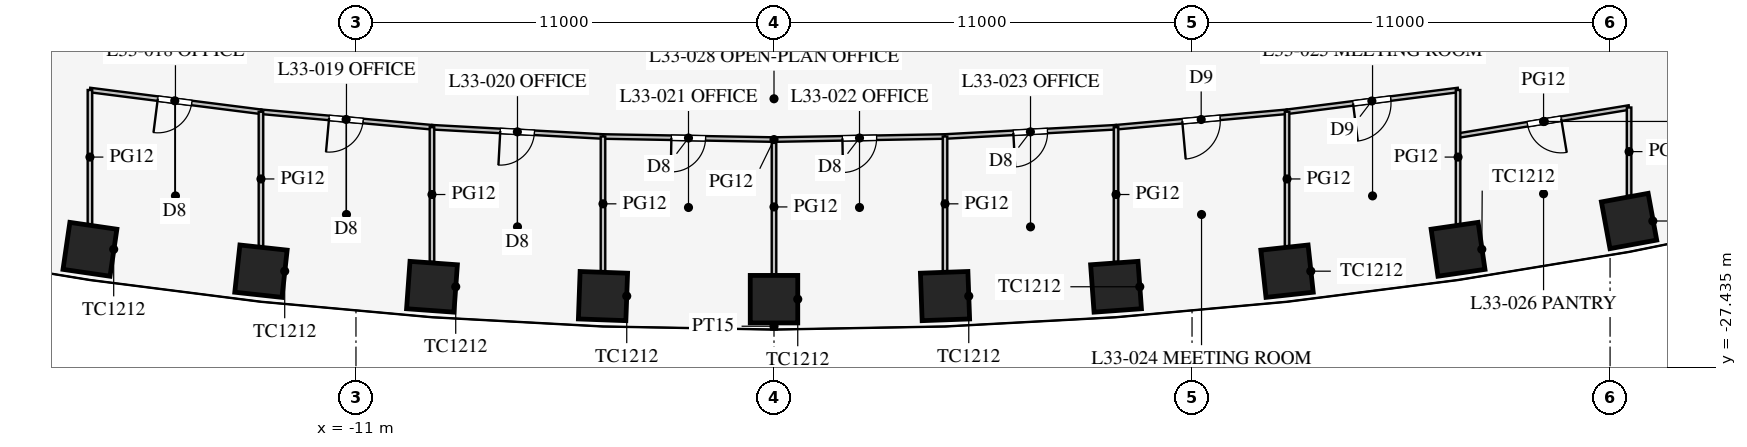
"""IFC4 building model, lengths in metres.
Left out: names, types, materials, properties, quantities, classifications, styles, units other than length and angle.
Written with IfcOpenShell. Run it as: python <this file> out.ifc"""

import sys

from ifc_helpers import new_model, si_unit, direction, frame, frame_2d, origin, origin_2d, place, context, subcontext, project, spatial, rectangle, extrude, element, fill, save


model = new_model("IFC4")
c1 = context("Model", 3, precision=1e-05, world=origin(), true_north=direction((0.0, 1.0)))
c2 = subcontext(c1, "Body", "Model", "MODEL_VIEW")
j1 = project(units=[si_unit("LENGTHUNIT", "METRE"), si_unit("PLANEANGLEUNIT", "RADIAN")], contexts=[c1])
p1 = place(None, origin())
s1 = spatial("IfcSite", under=j1, at=p1, CompositionType="ELEMENT")
p2 = place(p1, origin())
s2 = spatial("IfcBuilding", under=s1, at=p2, CompositionType="ELEMENT")
p3 = place(p2, frame((0.0, 0.0, 145.1)))
s3 = spatial("IfcBuildingStorey", under=s2, at=p3, CompositionType="ELEMENT", Elevation=145.1)
for number, where, z_axis, x_axis in (
    (1, (-18.0, -24.337, 0.0), (0.0, 0.0, 1.0), (0.99, -0.144, 0.0)),
    (2, (-13.5, -24.913, 0.0), (0.0, 0.0, 1.0), (0.994, -0.108, 0.0)),
    (3, (-9.0, -25.323, 0.0), (0.0, 0.0, 1.0), (0.997, -0.072, 0.0)),
    (4, (-4.5, -25.568, 0.0), (0.0, 0.0, 1.0), (0.999, -0.036, 0.0)),
    (5, (0.0, -25.65, 0.0), (0.0, 0.0, 1.0), (1.0, 0.0, 0.0)),
    (6, (4.5, -25.568, 0.0), (0.0, 0.0, 1.0), (0.999, 0.036, 0.0)),
    (7, (9.0, -25.323, 0.0), (0.0, 0.0, 1.0), (0.997, 0.072, 0.0)),
    (8, (13.5, -24.913, 0.0), (0.0, 0.0, 1.0), (0.994, 0.108, 0.0)),
    (9, (18.0, -24.337, 0.0), (0.0, 0.0, 1.0), (0.99, 0.144, 0.0)),
    (10, (22.5, -23.593, 0.0), (0.0, 0.0, 1.0), (0.984, 0.18, 0.0)),
):
    element("IfcColumn", number, at=place(p3, frame(where, z_axis=z_axis, x_axis=x_axis)), inside=s3, PredefinedType="COLUMN", context=c2, shape_type="SweptSolid", body=[
        extrude(rectangle(XDim=1.25, YDim=1.25, at=origin_2d()), origin(), (0.0, 0.0, 1.0), 4.2),
    ])
p4 = place(p3, frame((0.0, -26.279, 0.0), z_axis=(0.0, 0.0, 1.0), x_axis=(0.0, -1.0, 0.0)))
e11 = element("IfcWall", 11, at=p4, inside=s3, PredefinedType="PARTITIONING", context=c2, shape_type="SweptSolid", body=[
    extrude(rectangle(XDim=0.166, YDim=0.15, at=frame_2d((0.083, 0.0))), origin(), (0.0, 0.0, 1.0), 2.9),
])
p5 = place(p3, frame((0.0, -21.45, 0.0), z_axis=(0.0, 0.0, 1.0), x_axis=(0.999837820638, 0.018009231578, 0.0)))
e12 = element("IfcWall", 12, at=p5, inside=s3, PredefinedType="PARTITIONING", context=c2, shape_type="SweptSolid", body=[
    extrude(rectangle(XDim=4.501, YDim=0.12, at=frame_2d((2.25, 0.0))), origin(), (0.0, 0.0, 1.0), 2.9),
])
p6 = place(p5, frame((1.8, 0.0, 0.15)))
e13 = element("IfcOpeningElement", 13, at=p6, cuts=e12, PredefinedType="OPENING", context=c2, shape_type="SweptSolid", body=[
    extrude(rectangle(XDim=0.9, YDim=2.1, at=frame_2d((0.45, 1.05))), frame((0.0, 0.07, 0.0), z_axis=(0.0, -1.0, 0.0), x_axis=(1.0, 0.0, 0.0)), (0.0, 0.0, 1.0), 0.14),
])
p7 = place(p3, frame((13.5, -20.718, 0.0), z_axis=(0.0, 0.0, 1.0), x_axis=(0.992010652594, 0.12615413247, 0.0)))
e14 = element("IfcWall", 14, at=p7, inside=s3, PredefinedType="PARTITIONING", context=c2, shape_type="SweptSolid", body=[
    extrude(rectangle(XDim=4.536, YDim=0.12, at=frame_2d((2.268, 0.0))), origin(), (0.0, 0.0, 1.0), 2.9),
])
p8 = place(p7, frame((1.75, 0.0, 0.15)))
e15 = element("IfcOpeningElement", 15, at=p8, cuts=e14, PredefinedType="OPENING", context=c2, shape_type="SweptSolid", body=[
    extrude(rectangle(XDim=1.0, YDim=2.1, at=frame_2d((0.5, 1.05))), frame((0.0, 0.07, 0.0), z_axis=(0.0, -1.0, 0.0), x_axis=(1.0, 0.0, 0.0)), (0.0, 0.0, 1.0), 0.14),
])
p9 = place(p3, frame((18.0, -21.345, 0.0), z_axis=(0.0, 0.0, 1.0), x_axis=(0.986764681833, 0.162158757664, 0.0)))
e16 = element("IfcWall", 16, at=p9, inside=s3, PredefinedType="PARTITIONING", context=c2, shape_type="SweptSolid", body=[
    extrude(rectangle(XDim=4.56, YDim=0.12, at=frame_2d((2.28, 0.0))), origin(), (0.0, 0.0, 1.0), 2.9),
])
p10 = place(p9, frame((1.85, 0.0, 0.15)))
e17 = element("IfcOpeningElement", 17, at=p10, cuts=e16, PredefinedType="OPENING", context=c2, shape_type="SweptSolid", body=[
    extrude(rectangle(XDim=0.9, YDim=2.1, at=frame_2d((0.45, 1.05))), frame((0.0, 0.07, 0.0), z_axis=(0.0, -1.0, 0.0), x_axis=(1.0, 0.0, 0.0)), (0.0, 0.0, 1.0), 0.14),
])
p11 = place(p3, frame((4.5, -21.369, 0.0), z_axis=(0.0, 0.0, 1.0), x_axis=(0.998537376538, 0.054065771581, 0.0)))
e18 = element("IfcWall", 18, at=p11, inside=s3, PredefinedType="PARTITIONING", context=c2, shape_type="SweptSolid", body=[
    extrude(rectangle(XDim=4.507, YDim=0.12, at=frame_2d((2.253, 0.0))), origin(), (0.0, 0.0, 1.0), 2.9),
])
p12 = place(p11, frame((1.8, 0.0, 0.15)))
e19 = element("IfcOpeningElement", 19, at=p12, cuts=e18, PredefinedType="OPENING", context=c2, shape_type="SweptSolid", body=[
    extrude(rectangle(XDim=0.9, YDim=2.1, at=frame_2d((0.45, 1.05))), frame((0.0, 0.07, 0.0), z_axis=(0.0, -1.0, 0.0), x_axis=(1.0, 0.0, 0.0)), (0.0, 0.0, 1.0), 0.14),
])
p13 = place(p3, frame((9.0, -21.125, 0.0), z_axis=(0.0, 0.0, 1.0), x_axis=(0.995930325215, 0.090126507295, 0.0)))
e20 = element("IfcWall", 20, at=p13, inside=s3, PredefinedType="PARTITIONING", context=c2, shape_type="SweptSolid", body=[
    extrude(rectangle(XDim=4.518, YDim=0.12, at=frame_2d((2.259, 0.0))), origin(), (0.0, 0.0, 1.0), 2.9),
])
p14 = place(p13, frame((1.75, 0.0, 0.15)))
e21 = element("IfcOpeningElement", 21, at=p14, cuts=e20, PredefinedType="OPENING", context=c2, shape_type="SweptSolid", body=[
    extrude(rectangle(XDim=1.0, YDim=2.1, at=frame_2d((0.5, 1.05))), frame((0.0, 0.07, 0.0), z_axis=(0.0, -1.0, 0.0), x_axis=(1.0, 0.0, 0.0)), (0.0, 0.0, 1.0), 0.14),
])
p15 = place(p3, frame((-13.5, -20.718, 0.0), z_axis=(0.0, 0.0, 1.0), x_axis=(0.995930325215, -0.090126507295, 0.0)))
e22 = element("IfcWall", 22, at=p15, inside=s3, PredefinedType="PARTITIONING", context=c2, shape_type="SweptSolid", body=[
    extrude(rectangle(XDim=4.518, YDim=0.12, at=frame_2d((2.259, 0.0))), origin(), (0.0, 0.0, 1.0), 2.9),
])
p16 = place(p15, frame((1.8, 0.0, 0.15)))
e23 = element("IfcOpeningElement", 23, at=p16, cuts=e22, PredefinedType="OPENING", context=c2, shape_type="SweptSolid", body=[
    extrude(rectangle(XDim=0.9, YDim=2.1, at=frame_2d((0.45, 1.05))), frame((0.0, 0.07, 0.0), z_axis=(0.0, -1.0, 0.0), x_axis=(1.0, 0.0, 0.0)), (0.0, 0.0, 1.0), 0.14),
])
p17 = place(p3, frame((-18.0, -20.146, 0.0), z_axis=(0.0, 0.0, 1.0), x_axis=(0.992010652594, -0.12615413247, 0.0)))
e24 = element("IfcWall", 24, at=p17, inside=s3, PredefinedType="PARTITIONING", context=c2, shape_type="SweptSolid", body=[
    extrude(rectangle(XDim=4.536, YDim=0.12, at=frame_2d((2.268, 0.0))), origin(), (0.0, 0.0, 1.0), 2.9),
])
p18 = place(p17, frame((1.8, 0.0, 0.15)))
e25 = element("IfcOpeningElement", 25, at=p18, cuts=e24, PredefinedType="OPENING", context=c2, shape_type="SweptSolid", body=[
    extrude(rectangle(XDim=0.9, YDim=2.1, at=frame_2d((0.45, 1.05))), frame((0.0, 0.07, 0.0), z_axis=(0.0, -1.0, 0.0), x_axis=(1.0, 0.0, 0.0)), (0.0, 0.0, 1.0), 0.14),
])
p19 = place(p3, frame((-4.5, -21.369, 0.0), z_axis=(0.0, 0.0, 1.0), x_axis=(0.999837820638, -0.018009231578, 0.0)))
e26 = element("IfcWall", 26, at=p19, inside=s3, PredefinedType="PARTITIONING", context=c2, shape_type="SweptSolid", body=[
    extrude(rectangle(XDim=4.501, YDim=0.12, at=frame_2d((2.25, 0.0))), origin(), (0.0, 0.0, 1.0), 2.9),
])
p20 = place(p19, frame((1.8, 0.0, 0.15)))
e27 = element("IfcOpeningElement", 27, at=p20, cuts=e26, PredefinedType="OPENING", context=c2, shape_type="SweptSolid", body=[
    extrude(rectangle(XDim=0.9, YDim=2.1, at=frame_2d((0.45, 1.05))), frame((0.0, 0.07, 0.0), z_axis=(0.0, -1.0, 0.0), x_axis=(1.0, 0.0, 0.0)), (0.0, 0.0, 1.0), 0.14),
])
p21 = place(p3, frame((-9.0, -21.125, 0.0), z_axis=(0.0, 0.0, 1.0), x_axis=(0.998537376538, -0.054065771581, 0.0)))
e28 = element("IfcWall", 28, at=p21, inside=s3, PredefinedType="PARTITIONING", context=c2, shape_type="SweptSolid", body=[
    extrude(rectangle(XDim=4.507, YDim=0.12, at=frame_2d((2.253, 0.0))), origin(), (0.0, 0.0, 1.0), 2.9),
])
p22 = place(p21, frame((1.8, 0.0, 0.15)))
e29 = element("IfcOpeningElement", 29, at=p22, cuts=e28, PredefinedType="OPENING", context=c2, shape_type="SweptSolid", body=[
    extrude(rectangle(XDim=0.9, YDim=2.1, at=frame_2d((0.45, 1.05))), frame((0.0, 0.07, 0.0), z_axis=(0.0, -1.0, 0.0), x_axis=(1.0, 0.0, 0.0)), (0.0, 0.0, 1.0), 0.14),
])
p23 = place(p3, frame((0.0, -21.45, 0.0), z_axis=(0.0, 0.0, 1.0), x_axis=(0.0, -1.0, 0.0)))
e30 = element("IfcWall", 30, at=p23, inside=s3, PredefinedType="PARTITIONING", context=c2, shape_type="SweptSolid", body=[
    extrude(rectangle(XDim=3.545, YDim=0.12, at=frame_2d((1.772, 0.0))), origin(), (0.0, 0.0, 1.0), 2.9),
])
p24 = place(p3, frame((13.5, -20.718, 0.0), z_axis=(0.0, 0.0, 1.0), x_axis=(0.0, -1.0, 0.0)))
e31 = element("IfcWall", 31, at=p24, inside=s3, PredefinedType="PARTITIONING", context=c2, shape_type="SweptSolid", body=[
    extrude(rectangle(XDim=3.537, YDim=0.12, at=frame_2d((1.768, 0.0))), origin(), (0.0, 0.0, 1.0), 2.9),
])
p25 = place(p3, frame((18.0, -20.146, 0.0), z_axis=(0.0, 0.0, 1.0), x_axis=(0.0, -1.0, 0.0)))
e32 = element("IfcWall", 32, at=p25, inside=s3, PredefinedType="PARTITIONING", context=c2, shape_type="SweptSolid", body=[
    extrude(rectangle(XDim=3.53, YDim=0.12, at=frame_2d((1.765, 0.0))), origin(), (0.0, 0.0, 1.0), 2.9),
])
p26 = place(p3, frame((22.5, -20.606, 0.0), z_axis=(0.0, 0.0, 1.0), x_axis=(0.0, -1.0, 0.0)))
e33 = element("IfcWall", 33, at=p26, inside=s3, PredefinedType="PARTITIONING", context=c2, shape_type="SweptSolid", body=[
    extrude(rectangle(XDim=2.321, YDim=0.12, at=frame_2d((1.16, 0.0))), origin(), (0.0, 0.0, 1.0), 2.9),
])
p27 = place(p3, frame((4.5, -21.369, 0.0), z_axis=(0.0, 0.0, 1.0), x_axis=(0.0, -1.0, 0.0)))
e34 = element("IfcWall", 34, at=p27, inside=s3, PredefinedType="PARTITIONING", context=c2, shape_type="SweptSolid", body=[
    extrude(rectangle(XDim=3.544, YDim=0.12, at=frame_2d((1.772, 0.0))), origin(), (0.0, 0.0, 1.0), 2.9),
])
p28 = place(p3, frame((9.0, -21.125, 0.0), z_axis=(0.0, 0.0, 1.0), x_axis=(0.0, -1.0, 0.0)))
e35 = element("IfcWall", 35, at=p28, inside=s3, PredefinedType="PARTITIONING", context=c2, shape_type="SweptSolid", body=[
    extrude(rectangle(XDim=3.541, YDim=0.12, at=frame_2d((1.771, 0.0))), origin(), (0.0, 0.0, 1.0), 2.9),
])
p29 = place(p3, frame((-13.5, -20.718, 0.0), z_axis=(0.0, 0.0, 1.0), x_axis=(0.0, -1.0, 0.0)))
e36 = element("IfcWall", 36, at=p29, inside=s3, PredefinedType="PARTITIONING", context=c2, shape_type="SweptSolid", body=[
    extrude(rectangle(XDim=3.537, YDim=0.12, at=frame_2d((1.768, 0.0))), origin(), (0.0, 0.0, 1.0), 2.9),
])
p30 = place(p3, frame((-18.0, -20.146, 0.0), z_axis=(0.0, 0.0, 1.0), x_axis=(0.0, -1.0, 0.0)))
e37 = element("IfcWall", 37, at=p30, inside=s3, PredefinedType="PARTITIONING", context=c2, shape_type="SweptSolid", body=[
    extrude(rectangle(XDim=3.53, YDim=0.12, at=frame_2d((1.765, 0.0))), origin(), (0.0, 0.0, 1.0), 2.9),
])
p31 = place(p3, frame((-4.5, -21.369, 0.0), z_axis=(0.0, 0.0, 1.0), x_axis=(0.0, -1.0, 0.0)))
e38 = element("IfcWall", 38, at=p31, inside=s3, PredefinedType="PARTITIONING", context=c2, shape_type="SweptSolid", body=[
    extrude(rectangle(XDim=3.544, YDim=0.12, at=frame_2d((1.772, 0.0))), origin(), (0.0, 0.0, 1.0), 2.9),
])
p32 = place(p3, frame((-9.0, -21.125, 0.0), z_axis=(0.0, 0.0, 1.0), x_axis=(0.0, -1.0, 0.0)))
e39 = element("IfcWall", 39, at=p32, inside=s3, PredefinedType="PARTITIONING", context=c2, shape_type="SweptSolid", body=[
    extrude(rectangle(XDim=3.541, YDim=0.12, at=frame_2d((1.771, 0.0))), origin(), (0.0, 0.0, 1.0), 2.9),
])
p33 = place(p18, frame((0.9, 0.0, 0.0), z_axis=(0.0, 0.0, 1.0), x_axis=(-1.0, 0.0, 0.0)))
e40 = element("IfcDoor", 40, at=p33, inside=s3, OperationType="SINGLE_SWING_RIGHT", PredefinedType="DOOR", context=c2, shape_type="SweptSolid", body=[
    extrude(rectangle(XDim=0.9, YDim=2.1, at=frame_2d((0.45, 1.05))), frame((0.0, 0.025, 0.0), z_axis=(0.0, -1.0, 0.0), x_axis=(1.0, 0.0, 0.0)), (0.0, 0.0, 1.0), 0.05),
])
fill(e25, e40)
p34 = place(p16, frame((0.9, 0.0, 0.0), z_axis=(0.0, 0.0, 1.0), x_axis=(-1.0, 0.0, 0.0)))
e41 = element("IfcDoor", 41, at=p34, inside=s3, OperationType="SINGLE_SWING_RIGHT", PredefinedType="DOOR", context=c2, shape_type="SweptSolid", body=[
    extrude(rectangle(XDim=0.9, YDim=2.1, at=frame_2d((0.45, 1.05))), frame((0.0, 0.025, 0.0), z_axis=(0.0, -1.0, 0.0), x_axis=(1.0, 0.0, 0.0)), (0.0, 0.0, 1.0), 0.05),
])
fill(e23, e41)
p35 = place(p22, frame((0.9, 0.0, 0.0), z_axis=(0.0, 0.0, 1.0), x_axis=(-1.0, 0.0, 0.0)))
e42 = element("IfcDoor", 42, at=p35, inside=s3, OperationType="SINGLE_SWING_RIGHT", PredefinedType="DOOR", context=c2, shape_type="SweptSolid", body=[
    extrude(rectangle(XDim=0.9, YDim=2.1, at=frame_2d((0.45, 1.05))), frame((0.0, 0.025, 0.0), z_axis=(0.0, -1.0, 0.0), x_axis=(1.0, 0.0, 0.0)), (0.0, 0.0, 1.0), 0.05),
])
fill(e29, e42)
p36 = place(p20, frame((0.9, 0.0, 0.0), z_axis=(0.0, 0.0, 1.0), x_axis=(-1.0, 0.0, 0.0)))
e43 = element("IfcDoor", 43, at=p36, inside=s3, OperationType="SINGLE_SWING_RIGHT", PredefinedType="DOOR", context=c2, shape_type="SweptSolid", body=[
    extrude(rectangle(XDim=0.9, YDim=2.1, at=frame_2d((0.45, 1.05))), frame((0.0, 0.025, 0.0), z_axis=(0.0, -1.0, 0.0), x_axis=(1.0, 0.0, 0.0)), (0.0, 0.0, 1.0), 0.05),
])
fill(e27, e43)
p37 = place(p6, frame((0.9, 0.0, 0.0), z_axis=(0.0, 0.0, 1.0), x_axis=(-1.0, 0.0, 0.0)))
e44 = element("IfcDoor", 44, at=p37, inside=s3, OperationType="SINGLE_SWING_RIGHT", PredefinedType="DOOR", context=c2, shape_type="SweptSolid", body=[
    extrude(rectangle(XDim=0.9, YDim=2.1, at=frame_2d((0.45, 1.05))), frame((0.0, 0.025, 0.0), z_axis=(0.0, -1.0, 0.0), x_axis=(1.0, 0.0, 0.0)), (0.0, 0.0, 1.0), 0.05),
])
fill(e13, e44)
p38 = place(p12, frame((0.9, 0.0, 0.0), z_axis=(0.0, 0.0, 1.0), x_axis=(-1.0, 0.0, 0.0)))
e45 = element("IfcDoor", 45, at=p38, inside=s3, OperationType="SINGLE_SWING_RIGHT", PredefinedType="DOOR", context=c2, shape_type="SweptSolid", body=[
    extrude(rectangle(XDim=0.9, YDim=2.1, at=frame_2d((0.45, 1.05))), frame((0.0, 0.025, 0.0), z_axis=(0.0, -1.0, 0.0), x_axis=(1.0, 0.0, 0.0)), (0.0, 0.0, 1.0), 0.05),
])
fill(e19, e45)
p39 = place(p14, frame((1.0, 0.0, 0.0), z_axis=(0.0, 0.0, 1.0), x_axis=(-1.0, 0.0, 0.0)))
e46 = element("IfcDoor", 46, at=p39, inside=s3, OperationType="SINGLE_SWING_RIGHT", PredefinedType="DOOR", context=c2, shape_type="SweptSolid", body=[
    extrude(rectangle(XDim=1.0, YDim=2.1, at=frame_2d((0.5, 1.05))), frame((0.0, 0.025, 0.0), z_axis=(0.0, -1.0, 0.0), x_axis=(1.0, 0.0, 0.0)), (0.0, 0.0, 1.0), 0.05),
])
fill(e21, e46)
p40 = place(p8, frame((1.0, 0.0, 0.0), z_axis=(0.0, 0.0, 1.0), x_axis=(-1.0, 0.0, 0.0)))
e47 = element("IfcDoor", 47, at=p40, inside=s3, OperationType="SINGLE_SWING_RIGHT", PredefinedType="DOOR", context=c2, shape_type="SweptSolid", body=[
    extrude(rectangle(XDim=1.0, YDim=2.1, at=frame_2d((0.5, 1.05))), frame((0.0, 0.025, 0.0), z_axis=(0.0, -1.0, 0.0), x_axis=(1.0, 0.0, 0.0)), (0.0, 0.0, 1.0), 0.05),
])
fill(e15, e47)
p41 = place(p10, frame((0.9, 0.0, 0.0), z_axis=(0.0, 0.0, 1.0), x_axis=(-1.0, 0.0, 0.0)))
e48 = element("IfcDoor", 48, at=p41, inside=s3, OperationType="SINGLE_SWING_LEFT", PredefinedType="DOOR", context=c2, shape_type="SweptSolid", body=[
    extrude(rectangle(XDim=0.9, YDim=2.1, at=frame_2d((0.45, 1.05))), frame((0.0, 0.025, 0.0), z_axis=(0.0, -1.0, 0.0), x_axis=(1.0, 0.0, 0.0)), (0.0, 0.0, 1.0), 0.05),
])
fill(e17, e48)
save(model, sys.argv[1])
